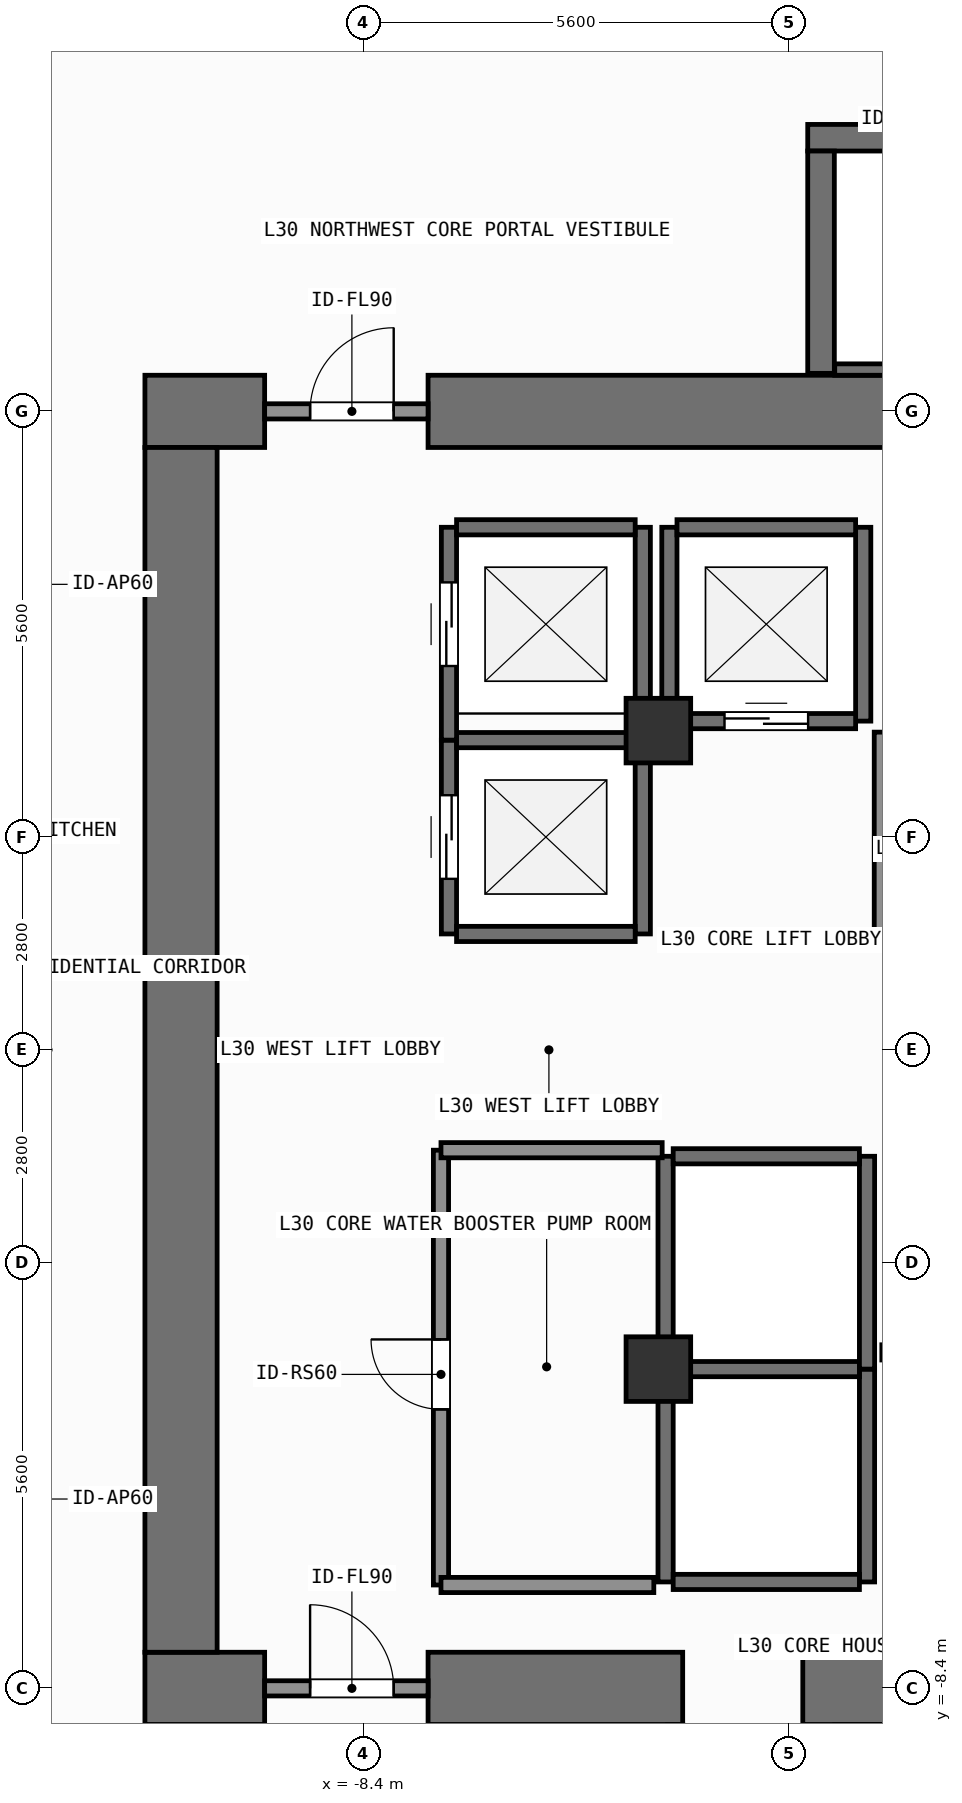
"""IFC4 building model, lengths in metres.
Left out: names, types, materials, properties, quantities, classifications, styles, units other than length and angle.
Written with IfcOpenShell. Run it as: python <this file> out.ifc"""

import sys

from ifc_helpers import new_model, si_unit, direction, frame, frame_2d, origin, origin_2d, place, context, subcontext, project, spatial, rectangle, extrude, element, fill, save


model = new_model("IFC4")
c1 = context("Model", 3, precision=1e-05, world=origin(), true_north=direction((0.0, 1.0)))
c2 = subcontext(c1, "Body", "Model", "MODEL_VIEW")
j1 = project(units=[si_unit("LENGTHUNIT", "METRE"), si_unit("PLANEANGLEUNIT", "RADIAN")], contexts=[c1])
p1 = place(None, origin())
s1 = spatial("IfcSite", under=j1, at=p1, CompositionType="ELEMENT")
p2 = place(p1, origin())
s2 = spatial("IfcBuilding", under=s1, at=p2, CompositionType="ELEMENT")
p3 = place(p2, frame((0.0, 0.0, 121.2)))
s3 = spatial("IfcBuildingStorey", under=s2, at=p3, CompositionType="ELEMENT", Elevation=121.2)
p4 = place(p3, frame((-11.275, -8.4, 0.0), z_axis=(0.0, 0.0, 1.0), x_axis=(1.0, 0.0, 0.0)))
e1 = element("IfcWall", 1, at=p4, inside=s3, PredefinedType="SHEAR", context=c2, shape_type="SweptSolid", body=[
    extrude(rectangle(XDim=1.575, YDim=0.95, at=frame_2d((0.788, 0.0))), origin(), (0.0, 0.0, 1.0), 3.9),
])
p5 = place(p3, frame((-7.55, -8.4, 0.0), z_axis=(0.0, 0.0, 1.0), x_axis=(1.0, 0.0, 0.0)))
e2 = element("IfcWall", 2, at=p5, inside=s3, PredefinedType="SHEAR", context=c2, shape_type="SweptSolid", body=[
    extrude(rectangle(XDim=3.35, YDim=0.95, at=frame_2d((1.675, 0.0))), origin(), (0.0, 0.0, 1.0), 3.9),
])
p6 = place(p3, frame((-2.62, -8.4, 0.0), z_axis=(0.0, 0.0, 1.0), x_axis=(1.0, 0.0, 0.0)))
e3 = element("IfcWall", 3, at=p6, inside=s3, PredefinedType="SHEAR", context=c2, shape_type="SweptSolid", body=[
    extrude(rectangle(XDim=7.27, YDim=0.95, at=frame_2d((3.635, 0.0))), origin(), (0.0, 0.0, 1.0), 3.9),
])
p7 = place(p3, frame((-11.275, 8.4, 0.0), z_axis=(0.0, 0.0, 1.0), x_axis=(1.0, 0.0, 0.0)))
e4 = element("IfcWall", 4, at=p7, inside=s3, PredefinedType="SHEAR", context=c2, shape_type="SweptSolid", body=[
    extrude(rectangle(XDim=1.575, YDim=0.95, at=frame_2d((0.788, 0.0))), origin(), (0.0, 0.0, 1.0), 3.9),
])
p8 = place(p3, frame((-7.55, 8.4, 0.0), z_axis=(0.0, 0.0, 1.0), x_axis=(1.0, 0.0, 0.0)))
e5 = element("IfcWall", 5, at=p8, inside=s3, PredefinedType="SHEAR", context=c2, shape_type="SweptSolid", body=[
    extrude(rectangle(XDim=16.425, YDim=0.95, at=frame_2d((8.212, 0.0))), origin(), (0.0, 0.0, 1.0), 3.9),
])
p9 = place(p3, frame((-10.8, -7.925, 0.0), z_axis=(0.0, 0.0, 1.0), x_axis=(0.0, 1.0, 0.0)))
e6 = element("IfcWall", 6, at=p9, inside=s3, PredefinedType="SHEAR", context=c2, shape_type="SweptSolid", body=[
    extrude(rectangle(XDim=15.85, YDim=0.95, at=frame_2d((7.925, 0.0))), origin(), (0.0, 0.0, 1.0), 3.9),
])
p10 = place(p3, frame((-2.555, 12.0, 0.0), z_axis=(0.0, 0.0, 1.0), x_axis=(1.0, 0.0, 0.0)))
e7 = element("IfcWall", 7, at=p10, inside=s3, PredefinedType="SHEAR", context=c2, shape_type="SweptSolid", body=[
    extrude(rectangle(XDim=7.31, YDim=0.35, at=frame_2d((3.655, 0.0))), origin(), (0.0, 0.0, 1.0), 3.9),
])
p11 = place(p3, frame((-2.2, 8.95, 0.0), z_axis=(0.0, 0.0, 1.0), x_axis=(1.0, 0.0, 0.0)))
e8 = element("IfcWall", 8, at=p11, inside=s3, PredefinedType="SHEAR", context=c2, shape_type="SweptSolid", body=[
    extrude(rectangle(XDim=6.6, YDim=0.15, at=frame_2d((3.3, 0.0))), origin(), (0.0, 0.0, 1.0), 3.9),
])
p12 = place(p3, frame((-2.38, 8.9, 0.0), z_axis=(0.0, 0.0, 1.0), x_axis=(0.0, 1.0, 0.0)))
e9 = element("IfcWall", 9, at=p12, inside=s3, PredefinedType="SHEAR", context=c2, shape_type="SweptSolid", body=[
    extrude(rectangle(XDim=2.925, YDim=0.35, at=frame_2d((1.462, 0.0))), origin(), (0.0, 0.0, 1.0), 3.9),
])
for number, where, z_axis, x_axis in (
    (10, (-4.52, -4.2, 0.0), (0.0, 0.0, 1.0), (1.0, 0.0, 0.0)),
    (11, (-4.52, 4.2, 0.0), (0.0, 0.0, 1.0), (1.0, 0.0, 0.0)),
):
    element("IfcColumn", number, at=place(p3, frame(where, z_axis=z_axis, x_axis=x_axis)), inside=s3, PredefinedType="COLUMN", context=c2, shape_type="SweptSolid", body=[
        extrude(rectangle(XDim=0.85, YDim=0.85, at=origin_2d()), origin(), (0.0, 0.0, 1.0), 3.9),
    ])
p13 = place(p3, frame((-7.275, 1.525, 0.0), z_axis=(0.0, 0.0, 1.0), x_axis=(0.0, 1.0, 0.0)))
e12 = element("IfcWall", 12, at=p13, inside=s3, PredefinedType="SHEAR", context=c2, shape_type="SweptSolid", body=[
    extrude(rectangle(XDim=2.55, YDim=0.2, at=frame_2d((1.275, 0.0))), origin(), (0.0, 0.0, 1.0), 3.68),
])
p14 = place(p13, frame((0.725, 0.0, 0.0)))
e13 = element("IfcOpeningElement", 13, at=p14, cuts=e12, PredefinedType="OPENING", context=c2, shape_type="SweptSolid", body=[
    extrude(rectangle(XDim=1.1, YDim=2.2, at=frame_2d((0.55, 1.1))), frame((0.0, 0.11, 0.0), z_axis=(0.0, -1.0, 0.0), x_axis=(1.0, 0.0, 0.0)), (0.0, 0.0, 1.0), 0.22),
])
p15 = place(p3, frame((-4.725, 1.525, 0.0), z_axis=(0.0, 0.0, 1.0), x_axis=(0.0, 1.0, 0.0)))
e14 = element("IfcWall", 14, at=p15, inside=s3, PredefinedType="SHEAR", context=c2, shape_type="SweptSolid", body=[
    extrude(rectangle(XDim=2.55, YDim=0.2, at=frame_2d((1.275, 0.0))), origin(), (0.0, 0.0, 1.0), 3.68),
])
for number, where, z_axis, x_axis in (
    (15, (-7.175, 1.525, 0.0), (0.0, 0.0, 1.0), (1.0, 0.0, 0.0)),
    (16, (-7.175, 4.075, 0.0), (0.0, 0.0, 1.0), (1.0, 0.0, 0.0)),
):
    element("IfcWall", number, at=place(p3, frame(where, z_axis=z_axis, x_axis=x_axis)), inside=s3, PredefinedType="SHEAR", context=c2, shape_type="SweptSolid", body=[
        extrude(rectangle(XDim=2.35, YDim=0.2, at=frame_2d((1.175, 0.0))), origin(), (0.0, 0.0, 1.0), 3.68),
    ])
p16 = place(p3, frame((-7.275, 4.075, 0.0), z_axis=(0.0, 0.0, 1.0), x_axis=(0.0, 1.0, 0.0)))
e17 = element("IfcWall", 17, at=p16, inside=s3, PredefinedType="SHEAR", context=c2, shape_type="SweptSolid", body=[
    extrude(rectangle(XDim=2.8, YDim=0.2, at=frame_2d((1.4, 0.0))), origin(), (0.0, 0.0, 1.0), 3.68),
])
p17 = place(p16, frame((0.975, 0.0, 0.0)))
e18 = element("IfcOpeningElement", 18, at=p17, cuts=e17, PredefinedType="OPENING", context=c2, shape_type="SweptSolid", body=[
    extrude(rectangle(XDim=1.1, YDim=2.2, at=frame_2d((0.55, 1.1))), frame((0.0, 0.11, 0.0), z_axis=(0.0, -1.0, 0.0), x_axis=(1.0, 0.0, 0.0)), (0.0, 0.0, 1.0), 0.22),
])
p18 = place(p3, frame((-4.725, 4.075, 0.0), z_axis=(0.0, 0.0, 1.0), x_axis=(0.0, 1.0, 0.0)))
e19 = element("IfcWall", 19, at=p18, inside=s3, PredefinedType="SHEAR", context=c2, shape_type="SweptSolid", body=[
    extrude(rectangle(XDim=2.8, YDim=0.2, at=frame_2d((1.4, 0.0))), origin(), (0.0, 0.0, 1.0), 3.68),
])
p19 = place(p3, frame((-7.175, 6.875, 0.0), z_axis=(0.0, 0.0, 1.0), x_axis=(1.0, 0.0, 0.0)))
e20 = element("IfcWall", 20, at=p19, inside=s3, PredefinedType="SHEAR", context=c2, shape_type="SweptSolid", body=[
    extrude(rectangle(XDim=2.35, YDim=0.2, at=frame_2d((1.175, 0.0))), origin(), (0.0, 0.0, 1.0), 3.68),
])
for number, where, z_axis, x_axis in (
    (21, (-4.375, 4.325, 0.0), (0.0, 0.0, 1.0), (0.0, 1.0, 0.0)),
    (22, (-1.825, 4.325, 0.0), (0.0, 0.0, 1.0), (0.0, 1.0, 0.0)),
):
    element("IfcWall", number, at=place(p3, frame(where, z_axis=z_axis, x_axis=x_axis)), inside=s3, PredefinedType="SHEAR", context=c2, shape_type="SweptSolid", body=[
        extrude(rectangle(XDim=2.55, YDim=0.2, at=frame_2d((1.275, 0.0))), origin(), (0.0, 0.0, 1.0), 3.68),
    ])
p20 = place(p3, frame((-4.275, 4.325, 0.0), z_axis=(0.0, 0.0, 1.0), x_axis=(1.0, 0.0, 0.0)))
e23 = element("IfcWall", 23, at=p20, inside=s3, PredefinedType="SHEAR", context=c2, shape_type="SweptSolid", body=[
    extrude(rectangle(XDim=2.35, YDim=0.2, at=frame_2d((1.175, 0.0))), origin(), (0.0, 0.0, 1.0), 3.68),
])
p21 = place(p20, frame((0.625, 0.0, 0.0)))
e24 = element("IfcOpeningElement", 24, at=p21, cuts=e23, PredefinedType="OPENING", context=c2, shape_type="SweptSolid", body=[
    extrude(rectangle(XDim=1.1, YDim=2.2, at=frame_2d((0.55, 1.1))), frame((0.0, 0.11, 0.0), z_axis=(0.0, -1.0, 0.0), x_axis=(1.0, 0.0, 0.0)), (0.0, 0.0, 1.0), 0.22),
])
p22 = place(p3, frame((-4.275, 6.875, 0.0), z_axis=(0.0, 0.0, 1.0), x_axis=(1.0, 0.0, 0.0)))
e25 = element("IfcWall", 25, at=p22, inside=s3, PredefinedType="SHEAR", context=c2, shape_type="SweptSolid", body=[
    extrude(rectangle(XDim=2.35, YDim=0.2, at=frame_2d((1.175, 0.0))), origin(), (0.0, 0.0, 1.0), 3.68),
])
for number, where, z_axis, x_axis in (
    (26, (-4.425, -7.0, 0.0), (0.0, 0.0, 1.0), (0.0, 1.0, 0.0)),
    (27, (-1.775, -7.0, 0.0), (0.0, 0.0, 1.0), (0.0, 1.0, 0.0)),
):
    element("IfcWall", number, at=place(p3, frame(where, z_axis=z_axis, x_axis=x_axis)), inside=s3, PredefinedType="SHEAR", context=c2, shape_type="SweptSolid", body=[
        extrude(rectangle(XDim=2.8, YDim=0.2, at=frame_2d((1.4, 0.0))), origin(), (0.0, 0.0, 1.0), 3.68),
    ])
for number, where, z_axis, x_axis in (
    (28, (-4.325, -7.0, 0.0), (0.0, 0.0, 1.0), (1.0, 0.0, 0.0)),
    (29, (-4.325, -4.2, 0.0), (0.0, 0.0, 1.0), (1.0, 0.0, 0.0)),
):
    element("IfcWall", number, at=place(p3, frame(where, z_axis=z_axis, x_axis=x_axis)), inside=s3, PredefinedType="SHEAR", context=c2, shape_type="SweptSolid", body=[
        extrude(rectangle(XDim=2.45, YDim=0.2, at=frame_2d((1.225, 0.0))), origin(), (0.0, 0.0, 1.0), 3.68),
    ])
for number, where, z_axis, x_axis in (
    (30, (-4.425, -4.2, 0.0), (0.0, 0.0, 1.0), (0.0, 1.0, 0.0)),
    (31, (-1.775, -4.2, 0.0), (0.0, 0.0, 1.0), (0.0, 1.0, 0.0)),
):
    element("IfcWall", number, at=place(p3, frame(where, z_axis=z_axis, x_axis=x_axis)), inside=s3, PredefinedType="SHEAR", context=c2, shape_type="SweptSolid", body=[
        extrude(rectangle(XDim=2.8, YDim=0.2, at=frame_2d((1.4, 0.0))), origin(), (0.0, 0.0, 1.0), 3.68),
    ])
p23 = place(p3, frame((-4.325, -1.4, 0.0), z_axis=(0.0, 0.0, 1.0), x_axis=(1.0, 0.0, 0.0)))
e32 = element("IfcWall", 32, at=p23, inside=s3, PredefinedType="SHEAR", context=c2, shape_type="SweptSolid", body=[
    extrude(rectangle(XDim=2.45, YDim=0.2, at=frame_2d((1.225, 0.0))), origin(), (0.0, 0.0, 1.0), 3.68),
])
p24 = place(p3, frame((-9.7, -8.4, 0.0), z_axis=(0.0, 0.0, 1.0), x_axis=(1.0, 0.0, 0.0)))
e33 = element("IfcWall", 33, at=p24, inside=s3, PredefinedType="SOLIDWALL", context=c2, shape_type="SweptSolid", body=[
    extrude(rectangle(XDim=2.15, YDim=0.2, at=frame_2d((1.075, 0.0))), origin(), (0.0, 0.0, 1.0), 2.72),
])
p25 = place(p24, frame((0.598, 0.0, 0.0)))
e34 = element("IfcOpeningElement", 34, at=p25, cuts=e33, PredefinedType="OPENING", context=c2, shape_type="SweptSolid", body=[
    extrude(rectangle(XDim=1.1, YDim=2.15, at=frame_2d((0.55, 1.075))), frame((0.0, 0.11, 0.0), z_axis=(0.0, -1.0, 0.0), x_axis=(1.0, 0.0, 0.0)), (0.0, 0.0, 1.0), 0.22),
])
p26 = place(p3, frame((-9.7, 8.4, 0.0), z_axis=(0.0, 0.0, 1.0), x_axis=(1.0, 0.0, 0.0)))
e35 = element("IfcWall", 35, at=p26, inside=s3, PredefinedType="SOLIDWALL", context=c2, shape_type="SweptSolid", body=[
    extrude(rectangle(XDim=2.15, YDim=0.2, at=frame_2d((1.075, 0.0))), origin(), (0.0, 0.0, 1.0), 2.72),
])
p27 = place(p26, frame((0.598, 0.0, 0.0)))
e36 = element("IfcOpeningElement", 36, at=p27, cuts=e35, PredefinedType="OPENING", context=c2, shape_type="SweptSolid", body=[
    extrude(rectangle(XDim=1.1, YDim=2.15, at=frame_2d((0.55, 1.075))), frame((0.0, 0.11, 0.0), z_axis=(0.0, -1.0, 0.0), x_axis=(1.0, 0.0, 0.0)), (0.0, 0.0, 1.0), 0.22),
])
p28 = place(p3, frame((-7.38, -7.04, 0.0), z_axis=(0.0, 0.0, 1.0), x_axis=(0.0, 1.0, 0.0)))
e37 = element("IfcWall", 37, at=p28, inside=s3, PredefinedType="SOLIDWALL", context=c2, shape_type="SweptSolid", body=[
    extrude(rectangle(XDim=5.72, YDim=0.2, at=frame_2d((2.86, 0.0))), origin(), (0.0, 0.0, 1.0), 3.68),
])
p29 = place(p28, frame((2.31, 0.0, 0.0)))
e38 = element("IfcOpeningElement", 38, at=p29, cuts=e37, PredefinedType="OPENING", context=c2, shape_type="SweptSolid", body=[
    extrude(rectangle(XDim=0.92, YDim=2.1, at=frame_2d((0.46, 1.05))), frame((0.0, 0.11, 0.0), z_axis=(0.0, -1.0, 0.0), x_axis=(1.0, 0.0, 0.0)), (0.0, 0.0, 1.0), 0.22),
])
p30 = place(p3, frame((-7.38, -1.32, 0.0), z_axis=(0.0, 0.0, 1.0), x_axis=(1.0, 0.0, 0.0)))
e39 = element("IfcWall", 39, at=p30, inside=s3, PredefinedType="SOLIDWALL", context=c2, shape_type="SweptSolid", body=[
    extrude(rectangle(XDim=2.91, YDim=0.2, at=frame_2d((1.455, 0.0))), origin(), (0.0, 0.0, 1.0), 3.68),
])
p31 = place(p3, frame((-1.58, 1.48, 0.0), z_axis=(0.0, 0.0, 1.0), x_axis=(0.0, 1.0, 0.0)))
e40 = element("IfcWall", 40, at=p31, inside=s3, PredefinedType="SOLIDWALL", context=c2, shape_type="SweptSolid", body=[
    extrude(rectangle(XDim=2.7, YDim=0.2, at=frame_2d((1.35, 0.0))), origin(), (0.0, 0.0, 1.0), 3.68),
])
p32 = place(p3, frame((-7.38, -7.04, 0.0), z_axis=(0.0, 0.0, 1.0), x_axis=(1.0, 0.0, 0.0)))
e41 = element("IfcWall", 41, at=p32, inside=s3, PredefinedType="SOLIDWALL", context=c2, shape_type="SweptSolid", body=[
    extrude(rectangle(XDim=2.8, YDim=0.2, at=frame_2d((1.4, 0.0))), origin(), (0.0, 0.0, 1.0), 3.68),
])
p33 = place(p14, origin())
e42 = element("IfcDoor", 42, at=p33, inside=s3, OperationType="SLIDING_TO_LEFT", PredefinedType="DOOR", context=c2, shape_type="SweptSolid", body=[
    extrude(rectangle(XDim=1.1, YDim=2.2, at=frame_2d((0.55, 1.1))), frame((0.0, 0.025, 0.0), z_axis=(0.0, -1.0, 0.0), x_axis=(1.0, 0.0, 0.0)), (0.0, 0.0, 1.0), 0.05),
])
fill(e13, e42)
p34 = place(p17, origin())
e43 = element("IfcDoor", 43, at=p34, inside=s3, OperationType="SLIDING_TO_LEFT", PredefinedType="DOOR", context=c2, shape_type="SweptSolid", body=[
    extrude(rectangle(XDim=1.1, YDim=2.2, at=frame_2d((0.55, 1.1))), frame((0.0, 0.025, 0.0), z_axis=(0.0, -1.0, 0.0), x_axis=(1.0, 0.0, 0.0)), (0.0, 0.0, 1.0), 0.05),
])
fill(e18, e43)
p35 = place(p21, origin())
e44 = element("IfcDoor", 44, at=p35, inside=s3, OperationType="SLIDING_TO_LEFT", PredefinedType="DOOR", context=c2, shape_type="SweptSolid", body=[
    extrude(rectangle(XDim=1.1, YDim=2.2, at=frame_2d((0.55, 1.1))), frame((0.0, 0.025, 0.0), z_axis=(0.0, -1.0, 0.0), x_axis=(1.0, 0.0, 0.0)), (0.0, 0.0, 1.0), 0.05),
])
fill(e24, e44)
p36 = place(p25, origin())
e45 = element("IfcDoor", 45, at=p36, inside=s3, OperationType="SINGLE_SWING_LEFT", PredefinedType="DOOR", context=c2, shape_type="SweptSolid", body=[
    extrude(rectangle(XDim=1.1, YDim=2.15, at=frame_2d((0.55, 1.075))), frame((0.0, 0.025, 0.0), z_axis=(0.0, -1.0, 0.0), x_axis=(1.0, 0.0, 0.0)), (0.0, 0.0, 1.0), 0.05),
])
fill(e34, e45)
p37 = place(p27, origin())
e46 = element("IfcDoor", 46, at=p37, inside=s3, OperationType="SINGLE_SWING_RIGHT", PredefinedType="DOOR", context=c2, shape_type="SweptSolid", body=[
    extrude(rectangle(XDim=1.1, YDim=2.15, at=frame_2d((0.55, 1.075))), frame((0.0, 0.025, 0.0), z_axis=(0.0, -1.0, 0.0), x_axis=(1.0, 0.0, 0.0)), (0.0, 0.0, 1.0), 0.05),
])
fill(e36, e46)
p38 = place(p29, origin())
e47 = element("IfcDoor", 47, at=p38, inside=s3, OperationType="SINGLE_SWING_RIGHT", PredefinedType="DOOR", context=c2, shape_type="SweptSolid", body=[
    extrude(rectangle(XDim=0.92, YDim=2.1, at=frame_2d((0.46, 1.05))), frame((0.0, 0.025, 0.0), z_axis=(0.0, -1.0, 0.0), x_axis=(1.0, 0.0, 0.0)), (0.0, 0.0, 1.0), 0.05),
])
fill(e38, e47)
save(model, sys.argv[1])
